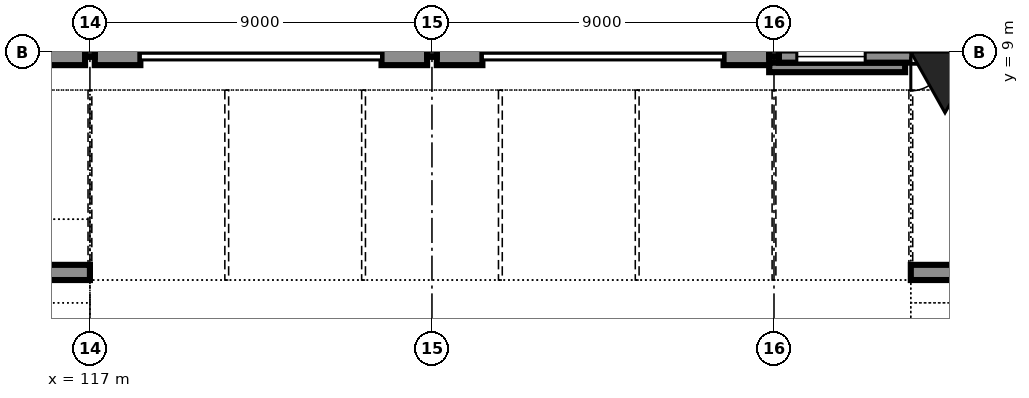
"""IFC4 building model, lengths in metres.
Left out: names, types, materials, properties, quantities, classifications, styles, units other than length and angle.
Written with IfcOpenShell. Run it as: python <this file> out.ifc"""

import sys

from ifc_helpers import new_model, si_unit, direction, frame, frame_2d, origin, origin_2d, place, context, subcontext, project, spatial, polyline, rectangle, i_section, outline, extrude, element, fill, save


model = new_model("IFC4")
c1 = context("Model", 3, precision=1e-05, world=origin(), true_north=direction((0.0, 1.0)))
c2 = subcontext(c1, "Body", "Model", "MODEL_VIEW")
j1 = project(units=[si_unit("LENGTHUNIT", "METRE"), si_unit("PLANEANGLEUNIT", "RADIAN")], contexts=[c1])
p1 = place(None, origin())
s1 = spatial("IfcSite", under=j1, at=p1, CompositionType="ELEMENT")
p2 = place(p1, origin())
s2 = spatial("IfcBuilding", under=s1, at=p2, CompositionType="ELEMENT")
p3 = place(p2, origin())
s3 = spatial("IfcBuildingStorey", under=s2, at=p3, CompositionType="ELEMENT", Elevation=0.0)
for number, where, z_axis, x_axis in (
    (1, (117.0, 9.0, -2.1), (0.0, 0.0, 1.0), (1.0, 0.0, 0.0)),
    (2, (126.0, 9.0, -2.1), (0.0, 0.0, 1.0), (1.0, 0.0, 0.0)),
    (3, (135.0, 9.0, -2.1), (0.0, 0.0, 1.0), (1.0, 0.0, 0.0)),
):
    element("IfcColumn", number, at=place(p3, frame(where, z_axis=z_axis, x_axis=x_axis)), inside=s3, PredefinedType="COLUMN", context=c2, shape_type="SweptSolid", body=[
        extrude(i_section(OverallWidth=0.255, OverallDepth=0.254, WebThickness=0.009, FlangeThickness=0.014, FilletRadius=0.013, at=origin_2d()), origin(), (0.0, 0.0, 1.0), 9.6),
    ])
p4 = place(p3, frame((115.5, 8.88, 0.0), z_axis=(0.0, 0.0, 1.0), x_axis=(1.0, 0.0, 0.0)))
e4 = element("IfcWall", 4, at=p4, inside=s3, PredefinedType="SOLIDWALL", context=c2, shape_type="SweptSolid", body=[
    extrude(rectangle(XDim=1.373, YDim=0.45, at=frame_2d((0.687, 0.0))), origin(), (0.0, 0.0, 1.0), 6.767),
])
for number, where, z_axis, x_axis in (
    (5, (117.127, 8.88, 0.0), (0.0, 0.0, 1.0), (1.0, 0.0, 0.0)),
    (6, (124.673, 8.88, 0.0), (0.0, 0.0, 1.0), (1.0, 0.0, 0.0)),
    (7, (126.127, 8.88, 0.0), (0.0, 0.0, 1.0), (1.0, 0.0, 0.0)),
    (8, (133.673, 8.88, 0.0), (0.0, 0.0, 1.0), (1.0, 0.0, 0.0)),
):
    element("IfcWall", number, at=place(p3, frame(where, z_axis=z_axis, x_axis=x_axis)), inside=s3, PredefinedType="SOLIDWALL", context=c2, shape_type="SweptSolid", body=[
        extrude(rectangle(XDim=1.2, YDim=0.45, at=frame_2d((0.6, 0.0))), origin(), (0.0, 0.0, 1.0), 6.767),
    ])
p5 = place(p3, frame((135.127, 8.88, 0.0), z_axis=(0.0, 0.0, 1.0), x_axis=(1.0, 0.0, 0.0)))
e9 = element("IfcWall", 9, at=p5, inside=s3, PredefinedType="SOLIDWALL", context=c2, shape_type="SweptSolid", body=[
    extrude(rectangle(XDim=8.746, YDim=0.32, at=frame_2d((4.373, 0.0))), origin(), (0.0, 0.0, 1.0), 6.767),
])
p6 = place(p5, frame((3.473, 0.0, 0.0)))
e10 = element("IfcOpeningElement", 10, at=p6, cuts=e9, PredefinedType="OPENING", context=c2, shape_type="SweptSolid", body=[
    extrude(rectangle(XDim=1.8, YDim=2.1, at=frame_2d((0.9, 1.05))), frame((0.0, 0.17, 0.0), z_axis=(0.0, -1.0, 0.0), x_axis=(1.0, 0.0, 0.0)), (0.0, 0.0, 1.0), 0.34),
])
p7 = place(p5, frame((3.773, 0.0, 2.55)))
e11 = element("IfcOpeningElement", 11, at=p7, cuts=e9, PredefinedType="OPENING", context=c2, shape_type="SweptSolid", body=[
    extrude(rectangle(XDim=1.2, YDim=0.6, at=frame_2d((0.6, 0.3))), frame((0.0, 0.17, 0.0), z_axis=(0.0, -1.0, 0.0), x_axis=(1.0, 0.0, 0.0)), (0.0, 0.0, 1.0), 0.34),
])
p8 = place(p5, frame((0.473, 0.0, 0.9)))
e12 = element("IfcOpeningElement", 12, at=p8, cuts=e9, PredefinedType="OPENING", context=c2, shape_type="SweptSolid", body=[
    extrude(rectangle(XDim=1.8, YDim=3.6, at=frame_2d((0.9, 1.8))), frame((0.0, 0.17, 0.0), z_axis=(0.0, -1.0, 0.0), x_axis=(1.0, 0.0, 0.0)), (0.0, 0.0, 1.0), 0.34),
])
p9 = place(p5, frame((6.473, 0.0, 0.9)))
e13 = element("IfcOpeningElement", 13, at=p9, cuts=e9, PredefinedType="OPENING", context=c2, shape_type="SweptSolid", body=[
    extrude(rectangle(XDim=1.8, YDim=3.6, at=frame_2d((0.9, 1.8))), frame((0.0, 0.17, 0.0), z_axis=(0.0, -1.0, 0.0), x_axis=(1.0, 0.0, 0.0)), (0.0, 0.0, 1.0), 0.34),
])
p10 = place(p3, frame((134.873, 8.595, 0.0), z_axis=(0.0, 0.0, 1.0), x_axis=(1.0, 0.0, 0.0)))
e14 = element("IfcWall", 14, at=p10, inside=s3, PredefinedType="SOLIDWALL", context=c2, shape_type="SweptSolid", body=[
    extrude(outline(polyline([(0.0, 0.0), (3.577, 0.0), (3.577, 6.767), (0.0, 6.767), (0.0, 0.0)]), holes=[polyline([(0.577, 0.75), (0.577, 4.5), (0.619, 4.752), (0.787, 4.968), (0.934, 5.022), (1.06, 5.166), (1.333, 5.31), (1.627, 5.4), (1.921, 5.31), (2.194, 5.166), (2.32, 5.022), (2.467, 4.968), (2.635, 4.752), (2.677, 4.5), (2.677, 0.75), (0.577, 0.75)])]), frame((0.0, 0.125, 0.0), z_axis=(0.0, -1.0, 0.0), x_axis=(1.0, 0.0, 0.0)), (0.0, 0.0, 1.0), 0.25),
])
p11 = place(p3, frame((115.0, 3.2, -0.8), z_axis=(0.0, 0.0, 1.0), x_axis=(1.0, 0.0, 0.0)))
e15 = element("IfcWall", 15, at=p11, inside=s3, PredefinedType="SOLIDWALL", context=c2, shape_type="SweptSolid", body=[
    extrude(rectangle(XDim=2.0, YDim=0.4, at=frame_2d((1.0, 0.0))), origin(), (0.0, 0.0, 1.0), 0.8),
])
p12 = place(p3, frame((138.6, 3.2, -0.8), z_axis=(0.0, 0.0, 1.0), x_axis=(1.0, 0.0, 0.0)))
e16 = element("IfcWall", 16, at=p12, inside=s3, PredefinedType="SOLIDWALL", context=c2, shape_type="SweptSolid", body=[
    extrude(rectangle(XDim=27.4, YDim=0.4, at=frame_2d((13.7, 0.0))), origin(), (0.0, 0.0, 1.0), 0.8),
])
p13 = place(p6, frame((1.8, 0.0, 0.0), z_axis=(0.0, 0.0, 1.0), x_axis=(-1.0, 0.0, 0.0)))
e17 = element("IfcDoor", 17, at=p13, inside=s3, OperationType="DOUBLE_DOOR_SINGLE_SWING", PredefinedType="DOOR", context=c2, shape_type="SweptSolid", body=[
    extrude(outline(polyline([(0.0, 0.0), (0.07, 0.0), (0.07, 2.03), (1.73, 2.03), (1.73, 0.0), (1.8, 0.0), (1.8, 2.1), (0.0, 2.1), (0.0, 0.0)])), frame((0.0, 0.025, 0.0), z_axis=(0.0, -1.0, 0.0), x_axis=(1.0, 0.0, 0.0)), (0.0, 0.0, 1.0), 0.05),
    extrude(outline(polyline([(0.074, 0.01), (0.897, 0.01), (0.897, 2.026), (0.074, 2.026), (0.074, 0.01)]), holes=[polyline([(0.194, 0.16), (0.777, 0.16), (0.777, 1.01), (0.194, 1.01), (0.194, 0.16)]), polyline([(0.335, 1.16), (0.635, 1.16), (0.635, 1.76), (0.335, 1.76), (0.335, 1.16)])]), frame((0.0, 0.017, 0.0), z_axis=(0.0, -1.0, 0.0), x_axis=(1.0, 0.0, 0.0)), (0.0, 0.0, 1.0), 0.035),
    extrude(rectangle(XDim=0.583, YDim=0.85, at=frame_2d((0.485, 0.585))), frame((0.0, 0.009, 0.0), z_axis=(0.0, -1.0, 0.0), x_axis=(1.0, 0.0, 0.0)), (0.0, 0.0, 1.0), 0.017),
    extrude(rectangle(XDim=0.3, YDim=0.6, at=frame_2d((0.485, 1.46))), frame((0.0, 0.006, 0.0), z_axis=(0.0, -1.0, 0.0), x_axis=(1.0, 0.0, 0.0)), (0.0, 0.0, 1.0), 0.012),
    extrude(outline(polyline([(0.903, 0.01), (1.726, 0.01), (1.726, 2.026), (0.903, 2.026), (0.903, 0.01)]), holes=[polyline([(1.023, 0.16), (1.606, 0.16), (1.606, 1.01), (1.023, 1.01), (1.023, 0.16)]), polyline([(1.165, 1.16), (1.465, 1.16), (1.465, 1.76), (1.165, 1.76), (1.165, 1.16)])]), frame((0.0, 0.017, 0.0), z_axis=(0.0, -1.0, 0.0), x_axis=(1.0, 0.0, 0.0)), (0.0, 0.0, 1.0), 0.035),
    extrude(rectangle(XDim=0.583, YDim=0.85, at=frame_2d((1.314, 0.585))), frame((0.0, 0.009, 0.0), z_axis=(0.0, -1.0, 0.0), x_axis=(1.0, 0.0, 0.0)), (0.0, 0.0, 1.0), 0.017),
    extrude(rectangle(XDim=0.3, YDim=0.6, at=frame_2d((1.314, 1.46))), frame((0.0, 0.006, 0.0), z_axis=(0.0, -1.0, 0.0), x_axis=(1.0, 0.0, 0.0)), (0.0, 0.0, 1.0), 0.012),
])
fill(e10, e17)
p14 = place(p7, origin())
e18 = element("IfcWindow", 18, at=p14, inside=s3, PartitioningType="SINGLE_PANEL", PredefinedType="WINDOW", context=c2, shape_type="SweptSolid", body=[
    extrude(outline(polyline([(0.0, 0.0), (1.2, 0.0), (1.2, 0.6), (0.0, 0.6), (0.0, 0.0)]), holes=[polyline([(0.07, 0.07), (1.13, 0.07), (1.13, 0.53), (0.07, 0.53), (0.07, 0.07)])]), frame((0.0, 0.03, 0.0), z_axis=(0.0, -1.0, 0.0), x_axis=(1.0, 0.0, 0.0)), (0.0, 0.0, 1.0), 0.06),
    extrude(outline(polyline([(0.07, 0.07), (1.13, 0.07), (1.13, 0.53), (0.07, 0.53), (0.07, 0.07)]), holes=[polyline([(0.1, 0.1), (1.1, 0.1), (1.1, 0.5), (0.1, 0.5), (0.1, 0.1)])]), frame((0.0, 0.022, 0.0), z_axis=(0.0, -1.0, 0.0), x_axis=(1.0, 0.0, 0.0)), (0.0, 0.0, 1.0), 0.045),
    extrude(rectangle(XDim=1.0, YDim=0.4, at=frame_2d((0.6, 0.3))), frame((0.0, 0.006, 0.0), z_axis=(0.0, -1.0, 0.0), x_axis=(1.0, 0.0, 0.0)), (0.0, 0.0, 1.0), 0.012),
])
fill(e11, e18)
p15 = place(p8, origin())
e19 = element("IfcWindow", 19, at=p15, inside=s3, PartitioningType="TRIPLE_PANEL_HORIZONTAL", PredefinedType="WINDOW", context=c2, shape_type="SweptSolid", body=[
    extrude(outline(polyline([(0.0, 0.0), (1.8, 0.0), (1.8, 2.54), (1.793, 2.666), (1.771, 2.79), (1.734, 2.91), (1.684, 3.026), (1.62, 3.135), (1.545, 3.235), (1.458, 3.326), (1.361, 3.407), (1.255, 3.475), (1.142, 3.531), (1.023, 3.573), (0.9, 3.6), (0.777, 3.573), (0.658, 3.531), (0.545, 3.475), (0.439, 3.407), (0.342, 3.326), (0.255, 3.235), (0.18, 3.135), (0.116, 3.026), (0.066, 2.91), (0.03, 2.79), (0.007, 2.666), (0.0, 2.54), (0.0, 0.0)]), holes=[polyline([(0.07, 0.07), (1.73, 0.07), (1.73, 2.54), (1.723, 2.657), (1.703, 2.772), (1.669, 2.884), (1.623, 2.991), (1.565, 3.092), (1.495, 3.186), (1.415, 3.271), (1.325, 3.346), (1.228, 3.41), (1.124, 3.463), (1.014, 3.503), (0.9, 3.53), (0.786, 3.503), (0.677, 3.463), (0.572, 3.41), (0.475, 3.346), (0.385, 3.271), (0.305, 3.186), (0.235, 3.092), (0.177, 2.991), (0.131, 2.884), (0.097, 2.772), (0.077, 2.657), (0.07, 2.54), (0.07, 0.07)])]), frame((0.0, 0.03, 0.0), z_axis=(0.0, -1.0, 0.0), x_axis=(1.0, 0.0, 0.0)), (0.0, 0.0, 1.0), 0.06),
    extrude(outline(polyline([(0.0, 2.54), (0.007, 2.666), (0.03, 2.79), (0.066, 2.91), (0.116, 3.026), (0.18, 3.135), (0.255, 3.235), (0.342, 3.326), (0.439, 3.407), (0.545, 3.475), (0.658, 3.531), (0.777, 3.573), (0.9, 3.6), (0.0, 3.6), (0.0, 2.54)])), frame((0.0, 0.028, 0.0), z_axis=(0.0, -1.0, 0.0), x_axis=(1.0, 0.0, 0.0)), (0.0, 0.0, 1.0), 0.056),
    extrude(outline(polyline([(0.9, 3.6), (1.023, 3.573), (1.142, 3.531), (1.255, 3.475), (1.361, 3.407), (1.458, 3.326), (1.545, 3.235), (1.62, 3.135), (1.684, 3.026), (1.734, 2.91), (1.771, 2.79), (1.793, 2.666), (1.8, 2.54), (1.8, 3.6), (0.9, 3.6)])), frame((0.0, 0.027, 0.0), z_axis=(0.0, -1.0, 0.0), x_axis=(1.0, 0.0, 0.0)), (0.0, 0.0, 1.0), 0.054),
    extrude(outline(polyline([(1.728, 2.58), (0.073, 2.58), (0.07, 2.54), (0.07, 2.5), (1.73, 2.5), (1.73, 2.54), (1.728, 2.58)])), frame((0.0, 0.021, 0.0), z_axis=(0.0, -1.0, 0.0), x_axis=(1.0, 0.0, 0.0)), (0.0, 0.0, 1.0), 0.042),
    extrude(rectangle(XDim=1.66, YDim=0.04, at=frame_2d((0.9, 0.873))), frame((0.0, 0.021, 0.0), z_axis=(0.0, -1.0, 0.0), x_axis=(1.0, 0.0, 0.0)), (0.0, 0.0, 1.0), 0.043),
    extrude(rectangle(XDim=1.66, YDim=0.04, at=frame_2d((0.9, 1.697))), frame((0.0, 0.021, 0.0), z_axis=(0.0, -1.0, 0.0), x_axis=(1.0, 0.0, 0.0)), (0.0, 0.0, 1.0), 0.043),
    extrude(outline(polyline([(0.07, 0.07), (1.73, 0.07), (1.73, 0.853), (0.07, 0.853), (0.07, 0.07)]), holes=[polyline([(0.1, 0.1), (1.7, 0.1), (1.7, 0.823), (0.1, 0.823), (0.1, 0.1)])]), frame((0.0, 0.022, 0.0), z_axis=(0.0, -1.0, 0.0), x_axis=(1.0, 0.0, 0.0)), (0.0, 0.0, 1.0), 0.045),
    extrude(rectangle(XDim=1.6, YDim=0.723, at=frame_2d((0.9, 0.462))), frame((0.0, 0.006, 0.0), z_axis=(0.0, -1.0, 0.0), x_axis=(1.0, 0.0, 0.0)), (0.0, 0.0, 1.0), 0.012),
    extrude(outline(polyline([(0.07, 0.893), (1.73, 0.893), (1.73, 1.677), (0.07, 1.677), (0.07, 0.893)]), holes=[polyline([(0.1, 0.923), (1.7, 0.923), (1.7, 1.647), (0.1, 1.647), (0.1, 0.923)])]), frame((0.0, 0.022, 0.0), z_axis=(0.0, -1.0, 0.0), x_axis=(1.0, 0.0, 0.0)), (0.0, 0.0, 1.0), 0.045),
    extrude(rectangle(XDim=1.6, YDim=0.723, at=frame_2d((0.9, 1.285))), frame((0.0, 0.006, 0.0), z_axis=(0.0, -1.0, 0.0), x_axis=(1.0, 0.0, 0.0)), (0.0, 0.0, 1.0), 0.012),
    extrude(outline(polyline([(0.07, 1.717), (1.73, 1.717), (1.73, 2.5), (0.07, 2.5), (0.07, 1.717)]), holes=[polyline([(0.1, 1.747), (1.7, 1.747), (1.7, 2.47), (0.1, 2.47), (0.1, 1.747)])]), frame((0.0, 0.022, 0.0), z_axis=(0.0, -1.0, 0.0), x_axis=(1.0, 0.0, 0.0)), (0.0, 0.0, 1.0), 0.045),
    extrude(rectangle(XDim=1.6, YDim=0.723, at=frame_2d((0.9, 2.108))), frame((0.0, 0.006, 0.0), z_axis=(0.0, -1.0, 0.0), x_axis=(1.0, 0.0, 0.0)), (0.0, 0.0, 1.0), 0.012),
    extrude(outline(polyline([(0.073, 2.58), (1.728, 2.58), (1.723, 2.657), (1.703, 2.772), (1.669, 2.884), (1.623, 2.991), (1.565, 3.092), (1.495, 3.186), (1.415, 3.271), (1.325, 3.346), (1.228, 3.41), (1.124, 3.463), (1.014, 3.503), (0.9, 3.53), (0.786, 3.503), (0.677, 3.463), (0.572, 3.41), (0.475, 3.346), (0.385, 3.271), (0.305, 3.186), (0.235, 3.092), (0.177, 2.991), (0.131, 2.884), (0.097, 2.772), (0.077, 2.657), (0.073, 2.58)]), holes=[polyline([(0.112, 2.653), (0.131, 2.764), (0.164, 2.872), (0.208, 2.975), (0.265, 3.073), (0.332, 3.164), (0.409, 3.246), (0.496, 3.318), (0.59, 3.38), (0.69, 3.431), (0.796, 3.469), (0.9, 3.494), (1.004, 3.469), (1.11, 3.431), (1.21, 3.38), (1.304, 3.318), (1.391, 3.246), (1.468, 3.164), (1.535, 3.073), (1.592, 2.975), (1.636, 2.872), (1.669, 2.764), (1.688, 2.653), (1.69, 2.615), (0.11, 2.615), (0.112, 2.653)])]), frame((0.0, 0.022, 0.0), z_axis=(0.0, -1.0, 0.0), x_axis=(1.0, 0.0, 0.0)), (0.0, 0.0, 1.0), 0.045),
    extrude(outline(polyline([(0.11, 2.615), (1.69, 2.615), (1.688, 2.653), (1.669, 2.764), (1.636, 2.872), (1.592, 2.975), (1.535, 3.073), (1.468, 3.164), (1.391, 3.246), (1.304, 3.318), (1.21, 3.38), (1.11, 3.431), (1.004, 3.469), (0.9, 3.494), (0.796, 3.469), (0.69, 3.431), (0.59, 3.38), (0.496, 3.318), (0.409, 3.246), (0.332, 3.164), (0.265, 3.073), (0.208, 2.975), (0.164, 2.872), (0.131, 2.764), (0.112, 2.653), (0.11, 2.615)])), frame((0.0, 0.006, 0.0), z_axis=(0.0, -1.0, 0.0), x_axis=(1.0, 0.0, 0.0)), (0.0, 0.0, 1.0), 0.012),
])
fill(e12, e19)
save(model, sys.argv[1])
